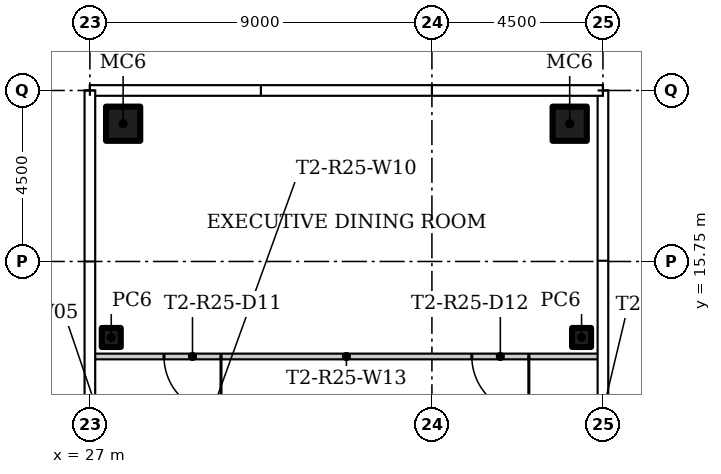
"""IFC4 building model, lengths in metres.
Left out: names, types, materials, properties, quantities, classifications, styles, units other than length and angle.
Written with IfcOpenShell. Run it as: python <this file> out.ifc"""

import sys

from ifc_helpers import new_model, si_unit, direction, frame, frame_2d, origin, origin_2d, place, context, subcontext, project, spatial, rectangle, hollow_rectangle, extrude, element, fill, save


model = new_model("IFC4")
c1 = context("Model", 3, precision=1e-05, world=origin(), true_north=direction((0.0, 1.0)))
c2 = subcontext(c1, "Body", "Model", "MODEL_VIEW")
j1 = project(units=[si_unit("LENGTHUNIT", "METRE"), si_unit("PLANEANGLEUNIT", "RADIAN")], contexts=[c1])
p1 = place(None, origin())
s1 = spatial("IfcSite", under=j1, at=p1, CompositionType="ELEMENT")
p2 = place(p1, origin())
s2 = spatial("IfcBuilding", under=s1, at=p2, CompositionType="ELEMENT")
p3 = place(p2, frame((0.0, 0.0, 230.4)))
s3 = spatial("IfcBuildingStorey", under=s2, at=p3, CompositionType="ELEMENT", Elevation=230.4)
p4 = place(p3, frame((39.938, 13.75, 0.0)))
e1 = element("IfcColumn", 1, at=p4, inside=s3, PredefinedType="COLUMN", context=c2, shape_type="SweptSolid", body=[
    extrude(hollow_rectangle(XDim=0.5, YDim=0.5, WallThickness=0.016, at=origin_2d()), origin(), (0.0, 0.0, 1.0), 3.55),
])
p5 = place(p3, frame((39.625, 19.375, 0.0)))
e2 = element("IfcColumn", 2, at=p5, inside=s3, PredefinedType="COLUMN", context=c2, shape_type="SweptSolid", body=[
    extrude(hollow_rectangle(XDim=0.9, YDim=0.9, WallThickness=0.036, at=origin_2d()), origin(), (0.0, 0.0, 1.0), 3.55),
])
p6 = place(p3, frame((27.562, 13.75, 0.0)))
e3 = element("IfcColumn", 3, at=p6, inside=s3, PredefinedType="COLUMN", context=c2, shape_type="SweptSolid", body=[
    extrude(hollow_rectangle(XDim=0.5, YDim=0.5, WallThickness=0.016, at=origin_2d()), origin(), (0.0, 0.0, 1.0), 3.55),
])
p7 = place(p3, frame((27.875, 19.375, 0.0)))
e4 = element("IfcColumn", 4, at=p7, inside=s3, PredefinedType="COLUMN", context=c2, shape_type="SweptSolid", body=[
    extrude(hollow_rectangle(XDim=0.9, YDim=0.9, WallThickness=0.036, at=origin_2d()), origin(), (0.0, 0.0, 1.0), 3.55),
])
p8 = place(p3, frame((40.405, 13.25, 0.0), z_axis=(0.0, 0.0, 1.0), x_axis=(-1.0, 0.0, 0.0)))
e5 = element("IfcWall", 5, at=p8, inside=s3, PredefinedType="PARTITIONING", context=c2, shape_type="SweptSolid", body=[
    extrude(rectangle(XDim=13.31, YDim=0.15, at=frame_2d((6.655, 0.0))), origin(), (0.0, 0.0, 1.0), 3.55),
])
p9 = place(p8, frame((9.955, 0.0, 0.0)))
e6 = element("IfcOpeningElement", 6, at=p9, cuts=e5, PredefinedType="OPENING", context=c2, shape_type="SweptSolid", body=[
    extrude(rectangle(XDim=1.5, YDim=2.1, at=frame_2d((0.75, 1.05))), frame((0.0, 0.085, 0.0), z_axis=(0.0, -1.0, 0.0), x_axis=(1.0, 0.0, 0.0)), (0.0, 0.0, 1.0), 0.17),
])
p10 = place(p8, frame((1.855, 0.0, 0.0)))
e7 = element("IfcOpeningElement", 7, at=p10, cuts=e5, PredefinedType="OPENING", context=c2, shape_type="SweptSolid", body=[
    extrude(rectangle(XDim=1.5, YDim=2.1, at=frame_2d((0.75, 1.05))), frame((0.0, 0.085, 0.0), z_axis=(0.0, -1.0, 0.0), x_axis=(1.0, 0.0, 0.0)), (0.0, 0.0, 1.0), 0.17),
])
p11 = place(p9, origin())
e8 = element("IfcDoor", 8, at=p11, inside=s3, OperationType="DOUBLE_DOOR_SINGLE_SWING", PredefinedType="DOOR", context=c2, shape_type="SweptSolid", body=[
    extrude(rectangle(XDim=1.5, YDim=2.1, at=frame_2d((0.75, 1.05))), frame((0.0, 0.025, 0.0), z_axis=(0.0, -1.0, 0.0), x_axis=(1.0, 0.0, 0.0)), (0.0, 0.0, 1.0), 0.05),
])
fill(e6, e8)
p12 = place(p10, origin())
e9 = element("IfcDoor", 9, at=p12, inside=s3, OperationType="DOUBLE_DOOR_SINGLE_SWING", PredefinedType="DOOR", context=c2, shape_type="SweptSolid", body=[
    extrude(rectangle(XDim=1.5, YDim=2.1, at=frame_2d((0.75, 1.05))), frame((0.0, 0.025, 0.0), z_axis=(0.0, -1.0, 0.0), x_axis=(1.0, 0.0, 0.0)), (0.0, 0.0, 1.0), 0.05),
])
fill(e7, e9)
save(model, sys.argv[1])
